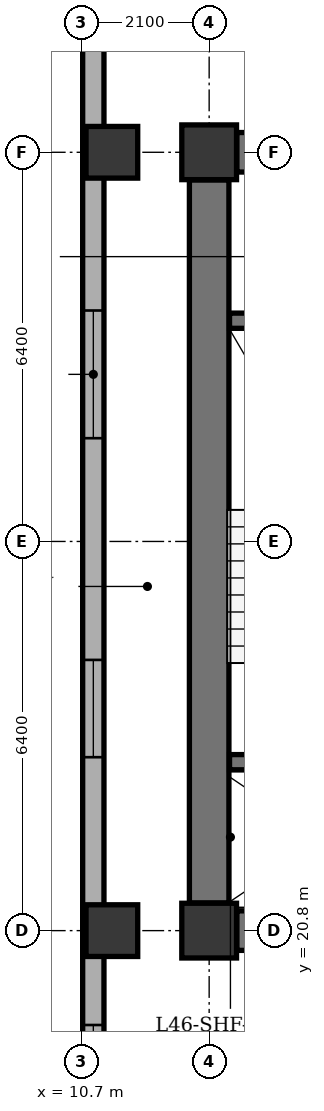
"""IFC4 building model, lengths in metres.
Left out: names, types, materials, properties, quantities, classifications, styles, units other than length and angle.
Written with IfcOpenShell. Run it as: python <this file> out.ifc"""

import sys

from ifc_helpers import new_model, si_unit, direction, frame, frame_2d, origin, origin_2d, place, context, subcontext, project, spatial, rectangle, extrude, element, fill, save


model = new_model("IFC4")
c1 = context("Model", 3, precision=1e-05, world=origin(), true_north=direction((0.0, 1.0)))
c2 = subcontext(c1, "Body", "Model", "MODEL_VIEW")
j1 = project(units=[si_unit("LENGTHUNIT", "METRE"), si_unit("PLANEANGLEUNIT", "RADIAN")], contexts=[c1])
p1 = place(None, origin())
s1 = spatial("IfcSite", under=j1, at=p1, CompositionType="ELEMENT")
p2 = place(p1, origin())
s2 = spatial("IfcBuilding", under=s1, at=p2, CompositionType="ELEMENT")
p3 = place(p2, frame((0.0, 0.0, 179.8)))
s3 = spatial("IfcBuildingStorey", under=s2, at=p3, CompositionType="ELEMENT", Elevation=179.8)
for number, where, z_axis, x_axis in (
    (1, (12.8, 20.8, 0.0), (0.0, 0.0, 1.0), (1.0, 0.0, 0.0)),
    (2, (12.8, 33.6, 0.0), (0.0, 0.0, 1.0), (1.0, 0.0, 0.0)),
):
    element("IfcColumn", number, at=place(p3, frame(where, z_axis=z_axis, x_axis=x_axis)), inside=s3, PredefinedType="COLUMN", context=c2, shape_type="SweptSolid", body=[
        extrude(rectangle(XDim=0.9, YDim=0.9, at=origin_2d()), origin(), (0.0, 0.0, 1.0), 3.5),
    ])
for number, where, z_axis, x_axis in (
    (3, (11.2, 20.8, 0.0), (0.0, 0.0, 1.0), (1.0, 0.0, 0.0)),
    (4, (11.2, 33.6, 0.0), (0.0, 0.0, 1.0), (1.0, 0.0, 0.0)),
):
    element("IfcColumn", number, at=place(p3, frame(where, z_axis=z_axis, x_axis=x_axis)), inside=s3, PredefinedType="COLUMN", context=c2, shape_type="SweptSolid", body=[
        extrude(rectangle(XDim=0.85, YDim=0.85, at=origin_2d()), origin(), (0.0, 0.0, 1.0), 3.5),
    ])
p4 = place(p3, frame((10.895, 12.9, 0.0), z_axis=(0.0, 0.0, 1.0), x_axis=(0.0, 1.0, 0.0)))
e5 = element("IfcWall", 5, at=p4, inside=s3, PredefinedType="STANDARD", context=c2, shape_type="SweptSolid", body=[
    extrude(rectangle(XDim=35.0, YDim=0.35, at=frame_2d((17.5, 0.0))), origin(), (0.0, 0.0, 1.0), 2.435),
])
p5 = place(p4, frame((1.652, 0.0, 0.75)))
e6 = element("IfcOpeningElement", 6, at=p5, cuts=e5, PredefinedType="OPENING", context=c2, shape_type="SweptSolid", body=[
    extrude(rectangle(XDim=1.6, YDim=1.565, at=frame_2d((0.8, 0.782))), frame((0.0, 0.185, 0.0), z_axis=(0.0, -1.0, 0.0), x_axis=(1.0, 0.0, 0.0)), (0.0, 0.0, 1.0), 0.37),
])
p6 = place(p4, frame((4.748, 0.0, 0.75)))
e7 = element("IfcOpeningElement", 7, at=p6, cuts=e5, PredefinedType="OPENING", context=c2, shape_type="SweptSolid", body=[
    extrude(rectangle(XDim=1.6, YDim=1.565, at=frame_2d((0.8, 0.782))), frame((0.0, 0.185, 0.0), z_axis=(0.0, -1.0, 0.0), x_axis=(1.0, 0.0, 0.0)), (0.0, 0.0, 1.0), 0.37),
])
p7 = place(p4, frame((10.752, 0.0, 0.75)))
e8 = element("IfcOpeningElement", 8, at=p7, cuts=e5, PredefinedType="OPENING", context=c2, shape_type="SweptSolid", body=[
    extrude(rectangle(XDim=1.6, YDim=1.565, at=frame_2d((0.8, 0.782))), frame((0.0, 0.185, 0.0), z_axis=(0.0, -1.0, 0.0), x_axis=(1.0, 0.0, 0.0)), (0.0, 0.0, 1.0), 0.37),
])
p8 = place(p4, frame((15.998, 0.0, 0.75)))
e9 = element("IfcOpeningElement", 9, at=p8, cuts=e5, PredefinedType="OPENING", context=c2, shape_type="SweptSolid", body=[
    extrude(rectangle(XDim=2.1, YDim=1.565, at=frame_2d((1.05, 0.782))), frame((0.0, 0.185, 0.0), z_axis=(0.0, -1.0, 0.0), x_axis=(1.0, 0.0, 0.0)), (0.0, 0.0, 1.0), 0.37),
])
p9 = place(p4, frame((23.916, 0.0, 0.75)))
e10 = element("IfcOpeningElement", 10, at=p9, cuts=e5, PredefinedType="OPENING", context=c2, shape_type="SweptSolid", body=[
    extrude(rectangle(XDim=1.6, YDim=1.565, at=frame_2d((0.8, 0.782))), frame((0.0, 0.185, 0.0), z_axis=(0.0, -1.0, 0.0), x_axis=(1.0, 0.0, 0.0)), (0.0, 0.0, 1.0), 0.37),
])
p10 = place(p4, frame((29.834, 0.0, 0.75)))
e11 = element("IfcOpeningElement", 11, at=p10, cuts=e5, PredefinedType="OPENING", context=c2, shape_type="SweptSolid", body=[
    extrude(rectangle(XDim=2.1, YDim=1.565, at=frame_2d((1.05, 0.782))), frame((0.0, 0.185, 0.0), z_axis=(0.0, -1.0, 0.0), x_axis=(1.0, 0.0, 0.0)), (0.0, 0.0, 1.0), 0.37),
])
p11 = place(p3, frame((12.8, 21.255, 0.0), z_axis=(0.0, 0.0, 1.0), x_axis=(0.0, 1.0, 0.0)))
e12 = element("IfcWall", 12, at=p11, inside=s3, PredefinedType="SHEAR", context=c2, shape_type="SweptSolid", body=[
    extrude(rectangle(XDim=11.89, YDim=0.65, at=frame_2d((5.945, 0.0))), origin(), (0.0, 0.0, 1.0), 3.05),
])
p12 = place(p3, frame((13.255, 20.8, 0.0), z_axis=(0.0, 0.0, 1.0), x_axis=(1.0, 0.0, 0.0)))
e13 = element("IfcWall", 13, at=p12, inside=s3, PredefinedType="SHEAR", context=c2, shape_type="SweptSolid", body=[
    extrude(rectangle(XDim=7.09, YDim=0.65, at=frame_2d((3.545, 0.0))), origin(), (0.0, 0.0, 1.0), 3.05),
])
p13 = place(p3, frame((13.255, 33.6, 0.0), z_axis=(0.0, 0.0, 1.0), x_axis=(1.0, 0.0, 0.0)))
e14 = element("IfcWall", 14, at=p13, inside=s3, PredefinedType="SHEAR", context=c2, shape_type="SweptSolid", body=[
    extrude(rectangle(XDim=7.09, YDim=0.65, at=frame_2d((3.545, 0.0))), origin(), (0.0, 0.0, 1.0), 3.05),
])
p14 = place(p13, frame((1.145, 0.0, 0.0)))
e15 = element("IfcOpeningElement", 15, at=p14, cuts=e14, PredefinedType="OPENING", context=c2, shape_type="SweptSolid", body=[
    extrude(rectangle(XDim=0.85, YDim=2.02, at=frame_2d((0.425, 1.01))), frame((0.0, 0.335, 0.0), z_axis=(0.0, -1.0, 0.0), x_axis=(1.0, 0.0, 0.0)), (0.0, 0.0, 1.0), 0.67),
])
for number, where, z_axis, x_axis in (
    (16, (13.135, 23.57, 0.0), (0.0, 0.0, 1.0), (1.0, 0.0, 0.0)),
    (17, (13.135, 30.83, 0.0), (0.0, 0.0, 1.0), (1.0, 0.0, 0.0)),
):
    element("IfcWall", number, at=place(p3, frame(where, z_axis=z_axis, x_axis=x_axis)), inside=s3, PredefinedType="SHEAR", context=c2, shape_type="SweptSolid", body=[
        extrude(rectangle(XDim=3.175, YDim=0.25, at=frame_2d((1.587, 0.0))), origin(), (0.0, 0.0, 1.0), 3.05),
    ])
p15 = place(p6, origin())
e18 = element("IfcWindow", 18, at=p15, inside=s3, PartitioningType="SINGLE_PANEL", PredefinedType="WINDOW", context=c2, shape_type="SweptSolid", body=[
    extrude(rectangle(XDim=1.6, YDim=1.565, at=frame_2d((0.8, 0.782))), frame((0.0, -0.01, 0.0), z_axis=(0.0, -1.0, 0.0), x_axis=(1.0, 0.0, 0.0)), (0.0, 0.0, 1.0), 0.06),
])
fill(e7, e18)
p16 = place(p7, origin())
e19 = element("IfcWindow", 19, at=p16, inside=s3, PartitioningType="SINGLE_PANEL", PredefinedType="WINDOW", context=c2, shape_type="SweptSolid", body=[
    extrude(rectangle(XDim=1.6, YDim=1.565, at=frame_2d((0.8, 0.782))), frame((0.0, -0.01, 0.0), z_axis=(0.0, -1.0, 0.0), x_axis=(1.0, 0.0, 0.0)), (0.0, 0.0, 1.0), 0.06),
])
fill(e8, e19)
p17 = place(p8, origin())
e20 = element("IfcWindow", 20, at=p17, inside=s3, PartitioningType="SINGLE_PANEL", PredefinedType="WINDOW", context=c2, shape_type="SweptSolid", body=[
    extrude(rectangle(XDim=2.1, YDim=1.565, at=frame_2d((1.05, 0.782))), frame((0.0, -0.01, 0.0), z_axis=(0.0, -1.0, 0.0), x_axis=(1.0, 0.0, 0.0)), (0.0, 0.0, 1.0), 0.06),
])
fill(e9, e20)
save(model, sys.argv[1])
